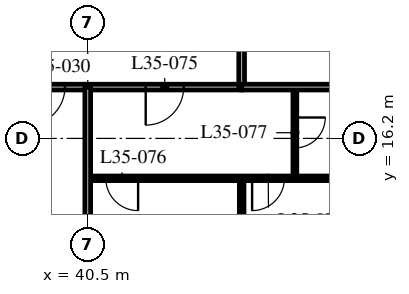
"""IFC4 building model, lengths in metres.
Left out: names, types, materials, properties, quantities, classifications, styles, units other than length and angle.
Written with IfcOpenShell. Run it as: python <this file> out.ifc"""

import sys

from ifc_helpers import new_model, si_unit, direction, frame, frame_2d, origin, place, context, subcontext, project, spatial, rectangle, extrude, element, fill, save


model = new_model("IFC4")
c1 = context("Model", 3, precision=1e-05, world=origin(), true_north=direction((0.0, 1.0)))
c2 = subcontext(c1, "Body", "Model", "MODEL_VIEW")
j1 = project(units=[si_unit("LENGTHUNIT", "METRE"), si_unit("PLANEANGLEUNIT", "RADIAN")], contexts=[c1])
p1 = place(None, origin())
s1 = spatial("IfcSite", under=j1, at=p1, CompositionType="ELEMENT")
p2 = place(p1, origin())
s2 = spatial("IfcBuilding", under=s1, at=p2, CompositionType="ELEMENT")
p3 = place(p2, frame((0.0, 0.0, 137.4)))
s3 = spatial("IfcBuildingStorey", under=s2, at=p3, CompositionType="ELEMENT", Elevation=137.4)
p4 = place(p3, frame((8.1, 17.55, 0.0), z_axis=(0.0, 0.0, 1.0), x_axis=(1.0, 0.0, 0.0)))
e1 = element("IfcWall", 1, at=p4, inside=s3, PredefinedType="PARTITIONING", context=c2, shape_type="SweptSolid", body=[
    extrude(rectangle(XDim=36.45, YDim=0.15, at=frame_2d((18.225, 0.0))), origin(), (0.0, 0.0, 1.0), 3.19),
])
p5 = place(p4, frame((9.625, 0.0, 0.0)))
e2 = element("IfcOpeningElement", 2, at=p5, cuts=e1, PredefinedType="OPENING", context=c2, shape_type="SweptSolid", body=[
    extrude(rectangle(XDim=1.0, YDim=2.1, at=frame_2d((0.5, 1.05))), frame((0.0, 0.085, 0.0), z_axis=(0.0, -1.0, 0.0), x_axis=(1.0, 0.0, 0.0)), (0.0, 0.0, 1.0), 0.17),
])
p6 = place(p4, frame((18.1, 0.0, 0.0)))
e3 = element("IfcOpeningElement", 3, at=p6, cuts=e1, PredefinedType="OPENING", context=c2, shape_type="SweptSolid", body=[
    extrude(rectangle(XDim=1.0, YDim=2.1, at=frame_2d((0.5, 1.05))), frame((0.0, 0.085, 0.0), z_axis=(0.0, -1.0, 0.0), x_axis=(1.0, 0.0, 0.0)), (0.0, 0.0, 1.0), 0.17),
])
p7 = place(p4, frame((26.75, 0.0, 0.0)))
e4 = element("IfcOpeningElement", 4, at=p7, cuts=e1, PredefinedType="OPENING", context=c2, shape_type="SweptSolid", body=[
    extrude(rectangle(XDim=1.0, YDim=2.1, at=frame_2d((0.5, 1.05))), frame((0.0, 0.085, 0.0), z_axis=(0.0, -1.0, 0.0), x_axis=(1.0, 0.0, 0.0)), (0.0, 0.0, 1.0), 0.17),
])
p8 = place(p4, frame((30.8, 0.0, 0.0)))
e5 = element("IfcOpeningElement", 5, at=p8, cuts=e1, PredefinedType="OPENING", context=c2, shape_type="SweptSolid", body=[
    extrude(rectangle(XDim=1.0, YDim=2.1, at=frame_2d((0.5, 1.05))), frame((0.0, 0.085, 0.0), z_axis=(0.0, -1.0, 0.0), x_axis=(1.0, 0.0, 0.0)), (0.0, 0.0, 1.0), 0.17),
])
p9 = place(p4, frame((1.525, 0.0, 0.0)))
e6 = element("IfcOpeningElement", 6, at=p9, cuts=e1, PredefinedType="OPENING", context=c2, shape_type="SweptSolid", body=[
    extrude(rectangle(XDim=1.0, YDim=2.1, at=frame_2d((0.5, 1.05))), frame((0.0, 0.085, 0.0), z_axis=(0.0, -1.0, 0.0), x_axis=(1.0, 0.0, 0.0)), (0.0, 0.0, 1.0), 0.17),
])
p10 = place(p4, frame((33.925, 0.0, 0.0)))
e7 = element("IfcOpeningElement", 7, at=p10, cuts=e1, PredefinedType="OPENING", context=c2, shape_type="SweptSolid", body=[
    extrude(rectangle(XDim=1.0, YDim=2.1, at=frame_2d((0.5, 1.05))), frame((0.0, 0.085, 0.0), z_axis=(0.0, -1.0, 0.0), x_axis=(1.0, 0.0, 0.0)), (0.0, 0.0, 1.0), 0.17),
])
p11 = place(p3, frame((44.55, 17.55, 0.0), z_axis=(0.0, 0.0, 1.0), x_axis=(0.0, 1.0, 0.0)))
e8 = element("IfcWall", 8, at=p11, inside=s3, PredefinedType="PARTITIONING", context=c2, shape_type="SweptSolid", body=[
    extrude(rectangle(XDim=28.35, YDim=0.15, at=frame_2d((14.175, 0.0))), origin(), (0.0, 0.0, 1.0), 3.19),
])
p12 = place(p11, frame((2.75, 0.0, 0.0)))
e9 = element("IfcOpeningElement", 9, at=p12, cuts=e8, PredefinedType="OPENING", context=c2, shape_type="SweptSolid", body=[
    extrude(rectangle(XDim=1.0, YDim=2.1, at=frame_2d((0.5, 1.05))), frame((0.0, 0.085, 0.0), z_axis=(0.0, -1.0, 0.0), x_axis=(1.0, 0.0, 0.0)), (0.0, 0.0, 1.0), 0.17),
])
p13 = place(p11, frame((6.5, 0.0, 0.0)))
e10 = element("IfcOpeningElement", 10, at=p13, cuts=e8, PredefinedType="OPENING", context=c2, shape_type="SweptSolid", body=[
    extrude(rectangle(XDim=1.0, YDim=2.1, at=frame_2d((0.5, 1.05))), frame((0.0, 0.085, 0.0), z_axis=(0.0, -1.0, 0.0), x_axis=(1.0, 0.0, 0.0)), (0.0, 0.0, 1.0), 0.17),
])
p14 = place(p11, frame((13.55, 0.0, 0.0)))
e11 = element("IfcOpeningElement", 11, at=p14, cuts=e8, PredefinedType="OPENING", context=c2, shape_type="SweptSolid", body=[
    extrude(rectangle(XDim=1.0, YDim=2.1, at=frame_2d((0.5, 1.05))), frame((0.0, 0.085, 0.0), z_axis=(0.0, -1.0, 0.0), x_axis=(1.0, 0.0, 0.0)), (0.0, 0.0, 1.0), 0.17),
])
p15 = place(p11, frame((18.1, 0.0, 0.0)))
e12 = element("IfcOpeningElement", 12, at=p15, cuts=e8, PredefinedType="OPENING", context=c2, shape_type="SweptSolid", body=[
    extrude(rectangle(XDim=1.0, YDim=2.1, at=frame_2d((0.5, 1.05))), frame((0.0, 0.085, 0.0), z_axis=(0.0, -1.0, 0.0), x_axis=(1.0, 0.0, 0.0)), (0.0, 0.0, 1.0), 0.17),
])
p16 = place(p11, frame((26.75, 0.0, 0.0)))
e13 = element("IfcOpeningElement", 13, at=p16, cuts=e8, PredefinedType="OPENING", context=c2, shape_type="SweptSolid", body=[
    extrude(rectangle(XDim=1.0, YDim=2.1, at=frame_2d((0.5, 1.05))), frame((0.0, 0.085, 0.0), z_axis=(0.0, -1.0, 0.0), x_axis=(1.0, 0.0, 0.0)), (0.0, 0.0, 1.0), 0.17),
])
p17 = place(p3, frame((40.5, 15.15, 0.0), z_axis=(0.0, 0.0, 1.0), x_axis=(1.0, 0.0, 0.0)))
e14 = element("IfcWall", 14, at=p17, inside=s3, PredefinedType="PARTITIONING", context=c2, shape_type="SweptSolid", body=[
    extrude(rectangle(XDim=8.05, YDim=0.12, at=frame_2d((4.025, 0.0))), origin(), (0.0, 0.0, 1.0), 3.19),
])
p18 = place(p17, frame((0.475, 0.0, 0.0)))
e15 = element("IfcOpeningElement", 15, at=p18, cuts=e14, PredefinedType="OPENING", context=c2, shape_type="SweptSolid", body=[
    extrude(rectangle(XDim=0.85, YDim=2.1, at=frame_2d((0.425, 1.05))), frame((0.0, 0.07, 0.0), z_axis=(0.0, -1.0, 0.0), x_axis=(1.0, 0.0, 0.0)), (0.0, 0.0, 1.0), 0.14),
])
p19 = place(p17, frame((4.325, 0.0, 0.0)))
e16 = element("IfcOpeningElement", 16, at=p19, cuts=e14, PredefinedType="OPENING", context=c2, shape_type="SweptSolid", body=[
    extrude(rectangle(XDim=0.85, YDim=2.1, at=frame_2d((0.425, 1.05))), frame((0.0, 0.07, 0.0), z_axis=(0.0, -1.0, 0.0), x_axis=(1.0, 0.0, 0.0)), (0.0, 0.0, 1.0), 0.14),
])
p20 = place(p3, frame((45.95, 17.55, 0.0), z_axis=(0.0, 0.0, 1.0), x_axis=(0.0, -1.0, 0.0)))
e17 = element("IfcWall", 17, at=p20, inside=s3, PredefinedType="PARTITIONING", context=c2, shape_type="SweptSolid", body=[
    extrude(rectangle(XDim=2.4, YDim=0.1, at=frame_2d((1.2, 0.0))), origin(), (0.0, 0.0, 1.0), 3.19),
])
p21 = place(p20, frame((0.8, 0.0, 0.0)))
e18 = element("IfcOpeningElement", 18, at=p21, cuts=e17, PredefinedType="OPENING", context=c2, shape_type="SweptSolid", body=[
    extrude(rectangle(XDim=0.8, YDim=2.1, at=frame_2d((0.4, 1.05))), frame((0.0, 0.06, 0.0), z_axis=(0.0, -1.0, 0.0), x_axis=(1.0, 0.0, 0.0)), (0.0, 0.0, 1.0), 0.12),
])
p22 = place(p3, frame((44.55, 15.15, 0.0), z_axis=(0.0, 0.0, 1.0), x_axis=(0.0, -1.0, 0.0)))
e19 = element("IfcWall", 19, at=p22, inside=s3, PredefinedType="PARTITIONING", context=c2, shape_type="SweptSolid", body=[
    extrude(rectangle(XDim=9.45, YDim=0.12, at=frame_2d((4.725, 0.0))), origin(), (0.0, 0.0, 1.0), 3.19),
])
p23 = place(p3, frame((44.55, 17.55, 0.0), z_axis=(0.0, 0.0, 1.0), x_axis=(1.0, 0.0, 0.0)))
e20 = element("IfcWall", 20, at=p23, inside=s3, PredefinedType="PARTITIONING", context=c2, shape_type="SweptSolid", body=[
    extrude(rectangle(XDim=11.85, YDim=0.15, at=frame_2d((5.925, 0.0))), origin(), (0.0, 0.0, 1.0), 3.19),
])
p24 = place(p3, frame((40.5, 17.55, 0.0), z_axis=(0.0, 0.0, 1.0), x_axis=(0.0, -1.0, 0.0)))
e21 = element("IfcWall", 21, at=p24, inside=s3, PredefinedType="PARTITIONING", context=c2, shape_type="SweptSolid", body=[
    extrude(rectangle(XDim=11.85, YDim=0.15, at=frame_2d((5.925, 0.0))), origin(), (0.0, 0.0, 1.0), 2.578),
])
p25 = place(p8, origin())
e22 = element("IfcDoor", 22, at=p25, inside=s3, OperationType="SINGLE_SWING_RIGHT", PredefinedType="DOOR", context=c2, shape_type="SweptSolid", body=[
    extrude(rectangle(XDim=1.0, YDim=2.1, at=frame_2d((0.5, 1.05))), frame((0.0, 0.025, 0.0), z_axis=(0.0, -1.0, 0.0), x_axis=(1.0, 0.0, 0.0)), (0.0, 0.0, 1.0), 0.05),
])
fill(e5, e22)
p26 = place(p10, origin())
e23 = element("IfcDoor", 23, at=p26, inside=s3, OperationType="SINGLE_SWING_RIGHT", PredefinedType="DOOR", context=c2, shape_type="SweptSolid", body=[
    extrude(rectangle(XDim=1.0, YDim=2.1, at=frame_2d((0.5, 1.05))), frame((0.0, 0.025, 0.0), z_axis=(0.0, -1.0, 0.0), x_axis=(1.0, 0.0, 0.0)), (0.0, 0.0, 1.0), 0.05),
])
fill(e7, e23)
p27 = place(p18, origin())
e24 = element("IfcDoor", 24, at=p27, inside=s3, OperationType="SINGLE_SWING_LEFT", PredefinedType="DOOR", context=c2, shape_type="SweptSolid", body=[
    extrude(rectangle(XDim=0.85, YDim=2.1, at=frame_2d((0.425, 1.05))), frame((0.0, 0.025, 0.0), z_axis=(0.0, -1.0, 0.0), x_axis=(1.0, 0.0, 0.0)), (0.0, 0.0, 1.0), 0.05),
])
fill(e15, e24)
p28 = place(p21, origin())
e25 = element("IfcDoor", 25, at=p28, inside=s3, OperationType="SINGLE_SWING_LEFT", PredefinedType="DOOR", context=c2, shape_type="SweptSolid", body=[
    extrude(rectangle(XDim=0.8, YDim=2.1, at=frame_2d((0.4, 1.05))), frame((0.0, 0.025, 0.0), z_axis=(0.0, -1.0, 0.0), x_axis=(1.0, 0.0, 0.0)), (0.0, 0.0, 1.0), 0.05),
])
fill(e18, e25)
p29 = place(p19, origin())
e26 = element("IfcDoor", 26, at=p29, inside=s3, OperationType="SINGLE_SWING_RIGHT", PredefinedType="DOOR", context=c2, shape_type="SweptSolid", body=[
    extrude(rectangle(XDim=0.85, YDim=2.1, at=frame_2d((0.425, 1.05))), frame((0.0, 0.025, 0.0), z_axis=(0.0, -1.0, 0.0), x_axis=(1.0, 0.0, 0.0)), (0.0, 0.0, 1.0), 0.05),
])
fill(e16, e26)
save(model, sys.argv[1])
